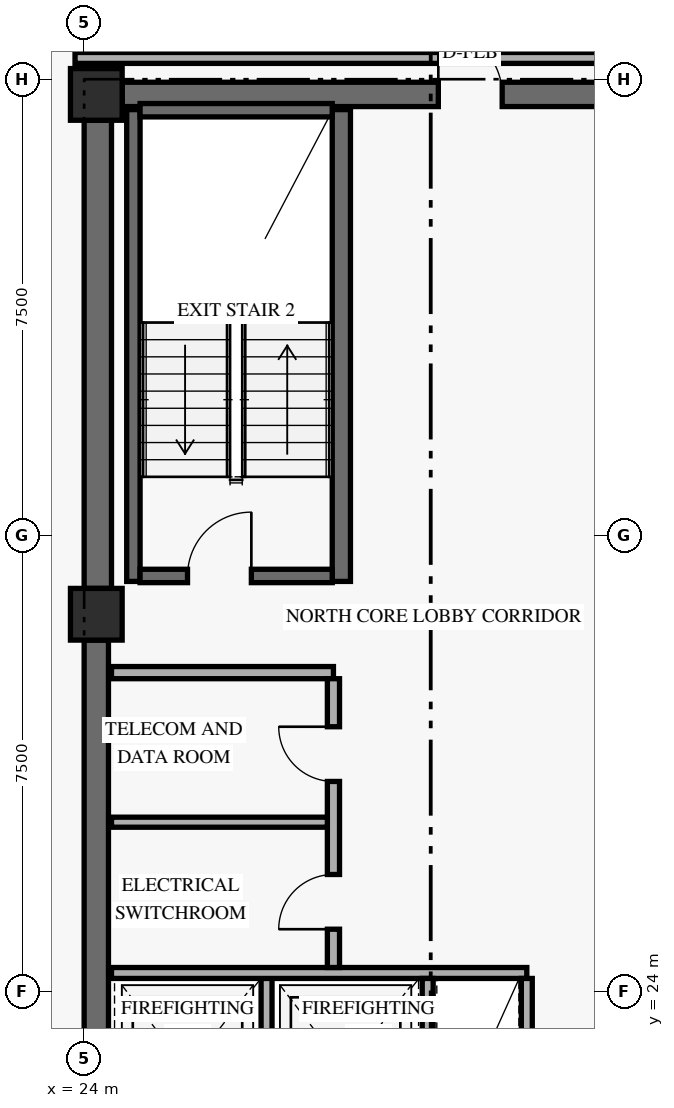
"""IFC4 building model, lengths in metres.
Left out: names, types, materials, properties, quantities, classifications, styles, units other than length and angle.
Written with IfcOpenShell. Run it as: python <this file> out.ifc"""

import sys

from ifc_helpers import new_model, si_unit, direction, frame, frame_2d, origin, origin_2d, place, context, subcontext, project, spatial, rectangle, extrude, element, fill, save


model = new_model("IFC4")
c1 = context("Model", 3, precision=1e-05, world=origin(), true_north=direction((0.0, 1.0)))
c2 = subcontext(c1, "Body", "Model", "MODEL_VIEW")
j1 = project(units=[si_unit("LENGTHUNIT", "METRE"), si_unit("PLANEANGLEUNIT", "RADIAN")], contexts=[c1])
p1 = place(None, origin())
s1 = spatial("IfcSite", under=j1, at=p1, CompositionType="ELEMENT")
p2 = place(p1, origin())
s2 = spatial("IfcBuilding", under=s1, at=p2, CompositionType="ELEMENT")
p3 = place(p2, frame((0.0, 0.0, 109.8)))
s3 = spatial("IfcBuildingStorey", under=s2, at=p3, CompositionType="ELEMENT", Elevation=109.8)
p4 = place(p3, frame((24.2, 17.975, 0.0), z_axis=(0.0, 0.0, 1.0), x_axis=(0.0, 1.0, 0.0)))
e1 = element("IfcWall", 1, at=p4, inside=s3, PredefinedType="SHEAR", context=c2, shape_type="SweptSolid", body=[
    extrude(rectangle(XDim=11.8, YDim=0.4, at=frame_2d((5.9, 0.0))), origin(), (0.0, 0.0, 1.0), 2.749),
])
p5 = place(p3, frame((24.225, 30.625, 0.0), z_axis=(0.0, 0.0, 1.0), x_axis=(0.0, 1.0, 0.0)))
e2 = element("IfcWall", 2, at=p5, inside=s3, PredefinedType="SHEAR", context=c2, shape_type="SweptSolid", body=[
    extrude(rectangle(XDim=7.7, YDim=0.45, at=frame_2d((3.85, 0.0))), origin(), (0.0, 0.0, 1.0), 2.749),
])
p6 = place(p3, frame((24.625, 38.75, 0.0), z_axis=(0.0, 0.0, 1.0), x_axis=(1.0, 0.0, 0.0)))
e3 = element("IfcWall", 3, at=p6, inside=s3, PredefinedType="SHEAR", context=c2, shape_type="SweptSolid", body=[
    extrude(rectangle(XDim=10.15, YDim=0.4, at=frame_2d((5.075, 0.0))), origin(), (0.0, 0.0, 1.0), 3.36),
])
p7 = place(p6, frame((5.2, 0.0, 0.0)))
e4 = element("IfcOpeningElement", 4, at=p7, cuts=e3, PredefinedType="OPENING", context=c2, shape_type="SweptSolid", body=[
    extrude(rectangle(XDim=1.05, YDim=2.15, at=frame_2d((0.525, 1.075))), frame((0.0, 0.21, 0.0), z_axis=(0.0, -1.0, 0.0), x_axis=(1.0, 0.0, 0.0)), (0.0, 0.0, 1.0), 0.42),
])
p8 = place(p3, frame((24.81, 30.74, 0.0), z_axis=(0.0, 0.0, 1.0), x_axis=(0.0, 1.0, 0.0)))
e5 = element("IfcWall", 5, at=p8, inside=s3, PredefinedType="SHEAR", context=c2, shape_type="SweptSolid", body=[
    extrude(rectangle(XDim=7.76, YDim=0.22, at=frame_2d((3.88, 0.0))), origin(), (0.0, 0.0, 1.0), 3.36),
])
p9 = place(p3, frame((28.23, 30.74, 0.0), z_axis=(0.0, 0.0, 1.0), x_axis=(0.0, 1.0, 0.0)))
e6 = element("IfcWall", 6, at=p9, inside=s3, PredefinedType="SHEAR", context=c2, shape_type="SweptSolid", body=[
    extrude(rectangle(XDim=7.76, YDim=0.3, at=frame_2d((3.88, 0.0))), origin(), (0.0, 0.0, 1.0), 3.36),
])
p10 = place(p3, frame((24.92, 30.83, 0.0), z_axis=(0.0, 0.0, 1.0), x_axis=(1.0, 0.0, 0.0)))
e7 = element("IfcWall", 7, at=p10, inside=s3, PredefinedType="SHEAR", context=c2, shape_type="SweptSolid", body=[
    extrude(rectangle(XDim=3.16, YDim=0.22, at=frame_2d((1.58, 0.0))), origin(), (0.0, 0.0, 1.0), 3.36),
])
p11 = place(p10, frame((0.78, 0.0, 0.0)))
e8 = element("IfcOpeningElement", 8, at=p11, cuts=e7, PredefinedType="OPENING", context=c2, shape_type="SweptSolid", body=[
    extrude(rectangle(XDim=1.05, YDim=2.15, at=frame_2d((0.525, 1.075))), frame((0.0, 0.12, 0.0), z_axis=(0.0, -1.0, 0.0), x_axis=(1.0, 0.0, 0.0)), (0.0, 0.0, 1.0), 0.24),
])
p12 = place(p3, frame((24.92, 38.49, 0.0), z_axis=(0.0, 0.0, 1.0), x_axis=(1.0, 0.0, 0.0)))
e9 = element("IfcWall", 9, at=p12, inside=s3, PredefinedType="SHEAR", context=c2, shape_type="SweptSolid", body=[
    extrude(rectangle(XDim=3.16, YDim=0.22, at=frame_2d((1.58, 0.0))), origin(), (0.0, 0.0, 1.0), 3.36),
])
for number, where, z_axis, x_axis in (
    (10, (24.2, 30.2, 0.0), (0.0, 0.0, 1.0), (1.0, 0.0, 0.0)),
    (11, (24.2, 38.75, 0.0), (0.0, 0.0, 1.0), (1.0, 0.0, 0.0)),
):
    element("IfcColumn", number, at=place(p3, frame(where, z_axis=z_axis, x_axis=x_axis)), inside=s3, PredefinedType="COLUMN", context=c2, shape_type="SweptSolid", body=[
        extrude(rectangle(XDim=0.85, YDim=0.85, at=origin_2d()), origin(), (0.0, 0.0, 1.0), 3.6),
    ])
p13 = place(p3, frame((27.0, 21.19, 0.0), z_axis=(0.0, 0.0, 1.0), x_axis=(0.0, 1.0, 0.0)))
e12 = element("IfcWall", 12, at=p13, inside=s3, PredefinedType="STANDARD", context=c2, shape_type="SweptSolid", body=[
    extrude(rectangle(XDim=3.11, YDim=0.18, at=frame_2d((1.555, 0.0))), origin(), (0.0, 0.0, 1.0), 3.36),
])
p14 = place(p3, frame((24.45, 24.3, 0.0), z_axis=(0.0, 0.0, 1.0), x_axis=(1.0, 0.0, 0.0)))
e13 = element("IfcWall", 13, at=p14, inside=s3, PredefinedType="STANDARD", context=c2, shape_type="SweptSolid", body=[
    extrude(rectangle(XDim=6.83, YDim=0.18, at=frame_2d((3.415, 0.0))), origin(), (0.0, 0.0, 1.0), 3.36),
])
for number, where, z_axis, x_axis in (
    (14, (29.65, 21.19, 0.0), (0.0, 0.0, 1.0), (0.0, 1.0, 0.0)),
    (15, (31.28, 21.19, 0.0), (0.0, 0.0, 1.0), (0.0, 1.0, 0.0)),
):
    element("IfcWall", number, at=place(p3, frame(where, z_axis=z_axis, x_axis=x_axis)), inside=s3, PredefinedType="STANDARD", context=c2, shape_type="SweptSolid", body=[
        extrude(rectangle(XDim=3.02, YDim=0.18, at=frame_2d((1.51, 0.0))), origin(), (0.0, 0.0, 1.0), 3.36),
    ])
p15 = place(p3, frame((24.45, 29.24, 0.0), z_axis=(0.0, 0.0, 1.0), x_axis=(1.0, 0.0, 0.0)))
e16 = element("IfcWall", 16, at=p15, inside=s3, PredefinedType="STANDARD", context=c2, shape_type="SweptSolid", body=[
    extrude(rectangle(XDim=3.65, YDim=0.2, at=frame_2d((1.825, 0.0))), origin(), (0.0, 0.0, 1.0), 3.36),
])
p16 = place(p3, frame((28.1, 24.39, 0.0), z_axis=(0.0, 0.0, 1.0), x_axis=(0.0, 1.0, 0.0)))
e17 = element("IfcWall", 17, at=p16, inside=s3, PredefinedType="STANDARD", context=c2, shape_type="SweptSolid", body=[
    extrude(rectangle(XDim=4.75, YDim=0.2, at=frame_2d((2.375, 0.0))), origin(), (0.0, 0.0, 1.0), 3.36),
])
p17 = place(p16, frame((0.63, 0.0, 0.0)))
e18 = element("IfcOpeningElement", 18, at=p17, cuts=e17, PredefinedType="OPENING", context=c2, shape_type="SweptSolid", body=[
    extrude(rectangle(XDim=0.9, YDim=2.1, at=frame_2d((0.45, 1.05))), frame((0.0, 0.11, 0.0), z_axis=(0.0, -1.0, 0.0), x_axis=(1.0, 0.0, 0.0)), (0.0, 0.0, 1.0), 0.22),
])
p18 = place(p16, frame((3.06, 0.0, 0.0)))
e19 = element("IfcOpeningElement", 19, at=p18, cuts=e17, PredefinedType="OPENING", context=c2, shape_type="SweptSolid", body=[
    extrude(rectangle(XDim=0.9, YDim=2.1, at=frame_2d((0.45, 1.05))), frame((0.0, 0.11, 0.0), z_axis=(0.0, -1.0, 0.0), x_axis=(1.0, 0.0, 0.0)), (0.0, 0.0, 1.0), 0.22),
])
p19 = place(p3, frame((24.45, 26.78, 0.0), z_axis=(0.0, 0.0, 1.0), x_axis=(1.0, 0.0, 0.0)))
e20 = element("IfcWall", 20, at=p19, inside=s3, PredefinedType="PARTITIONING", context=c2, shape_type="SweptSolid", body=[
    extrude(rectangle(XDim=3.55, YDim=0.165, at=frame_2d((1.775, 0.0))), origin(), (0.0, 0.0, 1.0), 3.36),
])
p20 = place(p3, frame((23.85, 39.35, 0.0), z_axis=(0.0, 0.0, 1.0), x_axis=(1.0, 0.0, 0.0)))
e21 = element("IfcWall", 21, at=p20, inside=s3, PredefinedType="STANDARD", context=c2, shape_type="SweptSolid", body=[
    extrude(rectangle(XDim=11.57, YDim=0.18, at=frame_2d((5.785, 0.0))), origin(), (0.0, 0.0, 1.0), 2.731),
])
p21 = place(p11, origin())
e22 = element("IfcDoor", 22, at=p21, inside=s3, OperationType="SINGLE_SWING_RIGHT", PredefinedType="DOOR", context=c2, shape_type="SweptSolid", body=[
    extrude(rectangle(XDim=1.05, YDim=2.15, at=frame_2d((0.525, 1.075))), frame((0.0, 0.025, 0.0), z_axis=(0.0, -1.0, 0.0), x_axis=(1.0, 0.0, 0.0)), (0.0, 0.0, 1.0), 0.05),
])
fill(e8, e22)
p22 = place(p17, origin())
e23 = element("IfcDoor", 23, at=p22, inside=s3, OperationType="SINGLE_SWING_LEFT", PredefinedType="DOOR", context=c2, shape_type="SweptSolid", body=[
    extrude(rectangle(XDim=0.9, YDim=2.1, at=frame_2d((0.45, 1.05))), frame((0.0, 0.025, 0.0), z_axis=(0.0, -1.0, 0.0), x_axis=(1.0, 0.0, 0.0)), (0.0, 0.0, 1.0), 0.05),
])
fill(e18, e23)
p23 = place(p18, origin())
e24 = element("IfcDoor", 24, at=p23, inside=s3, OperationType="SINGLE_SWING_RIGHT", PredefinedType="DOOR", context=c2, shape_type="SweptSolid", body=[
    extrude(rectangle(XDim=0.9, YDim=2.1, at=frame_2d((0.45, 1.05))), frame((0.0, 0.025, 0.0), z_axis=(0.0, -1.0, 0.0), x_axis=(1.0, 0.0, 0.0)), (0.0, 0.0, 1.0), 0.05),
])
fill(e19, e24)
p24 = place(p7, frame((1.05, 0.0, 0.0), z_axis=(0.0, 0.0, 1.0), x_axis=(-1.0, 0.0, 0.0)))
e25 = element("IfcDoor", 25, at=p24, inside=s3, OperationType="SINGLE_SWING_RIGHT", PredefinedType="DOOR", context=c2, shape_type="SweptSolid", body=[
    extrude(rectangle(XDim=1.05, YDim=2.15, at=frame_2d((0.525, 1.075))), frame((0.0, 0.025, 0.0), z_axis=(0.0, -1.0, 0.0), x_axis=(1.0, 0.0, 0.0)), (0.0, 0.0, 1.0), 0.05),
])
fill(e4, e25)
save(model, sys.argv[1])
